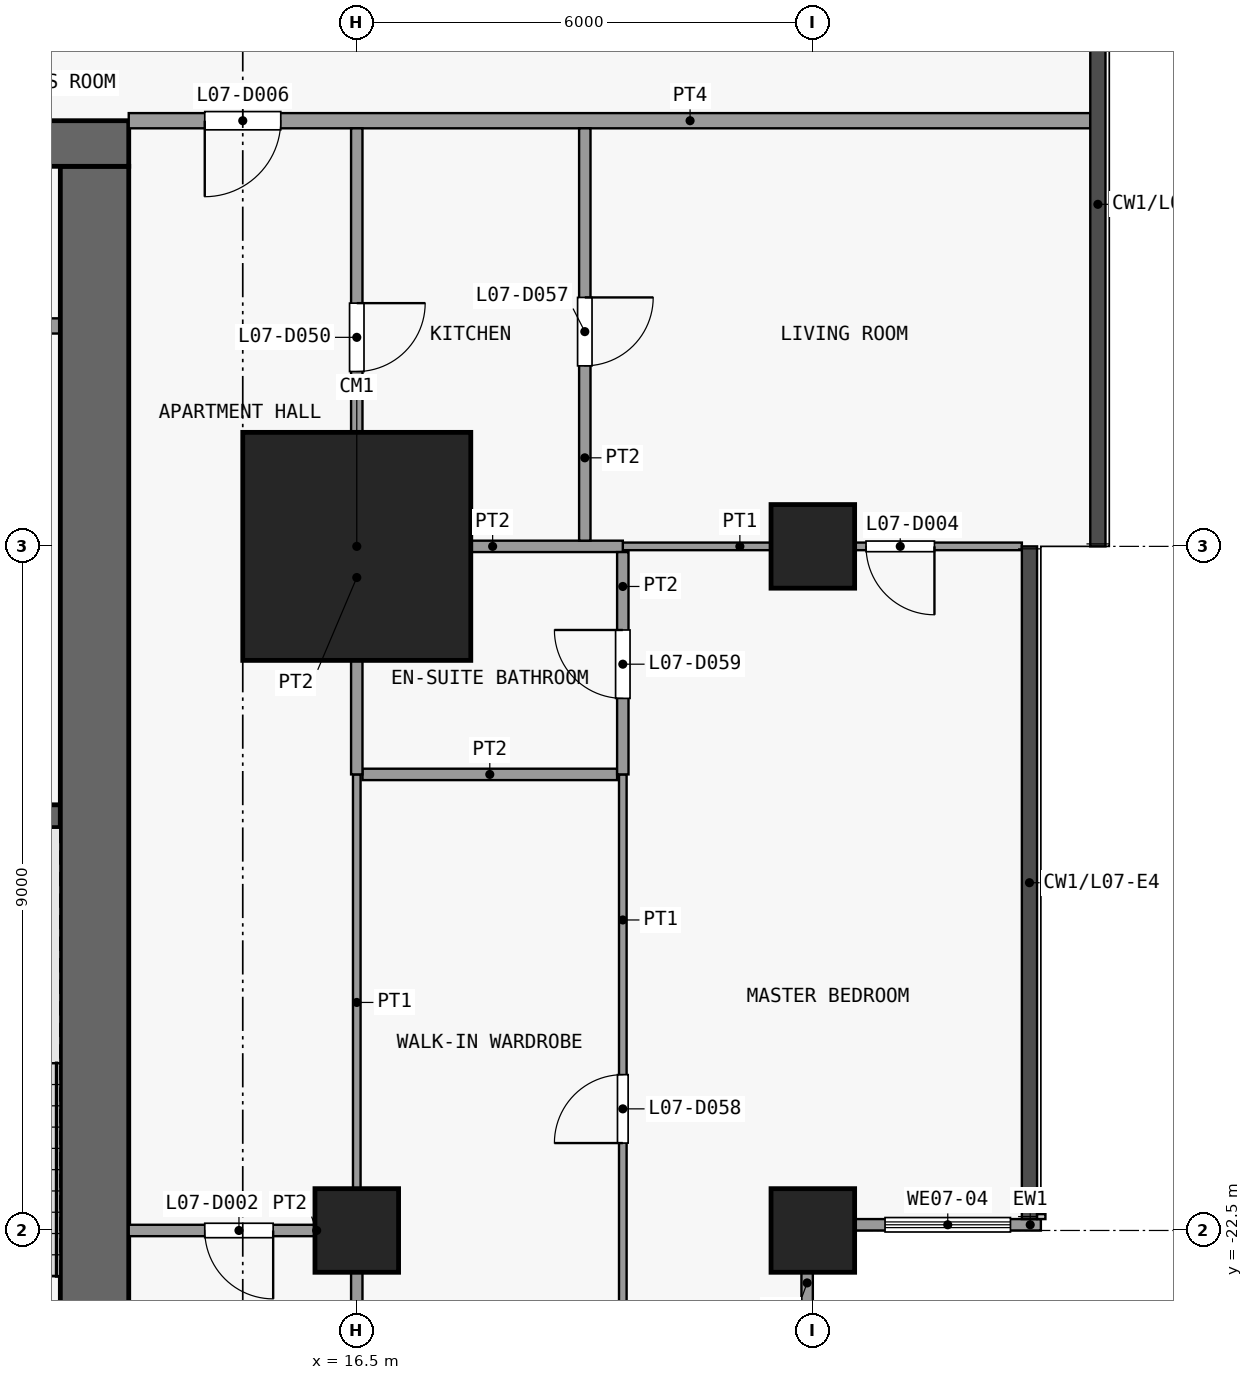
"""IFC4 building model, lengths in metres.
Left out: names, types, materials, properties, quantities, classifications, styles, units other than length and angle.
Written with IfcOpenShell. Run it as: python <this file> out.ifc"""

import sys

from ifc_helpers import new_model, si_unit, direction, frame, frame_2d, origin, origin_2d, place, context, subcontext, project, spatial, rectangle, extrude, element, fill, save


model = new_model("IFC4")
c1 = context("Model", 3, precision=1e-05, world=origin(), true_north=direction((0.0, 1.0)))
c2 = subcontext(c1, "Body", "Model", "MODEL_VIEW")
j1 = project(units=[si_unit("LENGTHUNIT", "METRE"), si_unit("PLANEANGLEUNIT", "RADIAN")], contexts=[c1])
p1 = place(None, origin())
s1 = spatial("IfcSite", under=j1, at=p1, CompositionType="ELEMENT")
p2 = place(p1, origin())
s2 = spatial("IfcBuilding", under=s1, at=p2, CompositionType="ELEMENT")
p3 = place(p2, frame((0.0, 0.0, 36.1)))
s3 = spatial("IfcBuildingStorey", under=s2, at=p3, CompositionType="ELEMENT", Elevation=36.1)
p4 = place(p3, frame((16.5, -22.5, 0.0), z_axis=(0.0, 0.0, 1.0), x_axis=(1.0, 0.0, 0.0)))
e1 = element("IfcColumn", 1, at=p4, inside=s3, PredefinedType="COLUMN", context=c2, shape_type="SweptSolid", body=[
    extrude(rectangle(XDim=1.1, YDim=1.1, at=origin_2d()), origin(), (0.0, 0.0, 1.0), 3.6),
])
p5 = place(p3, frame((16.5, -13.5, 0.0), z_axis=(0.0, 0.0, 1.0), x_axis=(1.0, 0.0, 0.0)))
e2 = element("IfcColumn", 2, at=p5, inside=s3, PredefinedType="COLUMN", context=c2, shape_type="SweptSolid", body=[
    extrude(rectangle(XDim=3.0, YDim=3.0, at=origin_2d()), origin(), (0.0, 0.0, 1.0), 3.6),
])
for number, where, z_axis, x_axis in (
    (3, (22.5, -22.5, 0.0), (0.0, 0.0, 1.0), (1.0, 0.0, 0.0)),
    (4, (22.5, -13.5, 0.0), (0.0, 0.0, 1.0), (1.0, 0.0, 0.0)),
):
    element("IfcColumn", number, at=place(p3, frame(where, z_axis=z_axis, x_axis=x_axis)), inside=s3, PredefinedType="COLUMN", context=c2, shape_type="SweptSolid", body=[
        extrude(rectangle(XDim=1.1, YDim=1.1, at=origin_2d()), origin(), (0.0, 0.0, 1.0), 3.6),
    ])
p6 = place(p3, frame((-13.5, -8.2, 0.0), z_axis=(0.0, 0.0, 1.0), x_axis=(1.0, 0.0, 0.0)))
e5 = element("IfcWall", 5, at=p6, inside=s3, PredefinedType="SHEAR", context=c2, shape_type="SweptSolid", body=[
    extrude(rectangle(XDim=27.0, YDim=0.6, at=frame_2d((13.5, 0.0))), origin(), (0.0, 0.0, 1.0), 3.3),
])
p7 = place(p6, frame((7.8, 0.0, 0.0)))
e6 = element("IfcOpeningElement", 6, at=p7, cuts=e5, PredefinedType="OPENING", context=c2, shape_type="SweptSolid", body=[
    extrude(rectangle(XDim=1.8, YDim=2.1, at=frame_2d((0.9, 1.05))), frame((0.0, 0.31, 0.0), z_axis=(0.0, -1.0, 0.0), x_axis=(1.0, 0.0, 0.0)), (0.0, 0.0, 1.0), 0.62),
])
p8 = place(p6, frame((17.4, 0.0, 0.0)))
e7 = element("IfcOpeningElement", 7, at=p8, cuts=e5, PredefinedType="OPENING", context=c2, shape_type="SweptSolid", body=[
    extrude(rectangle(XDim=1.8, YDim=2.1, at=frame_2d((0.9, 1.05))), frame((0.0, 0.31, 0.0), z_axis=(0.0, -1.0, 0.0), x_axis=(1.0, 0.0, 0.0)), (0.0, 0.0, 1.0), 0.62),
])
p9 = place(p6, frame((2.725, 0.0, 0.0)))
e8 = element("IfcOpeningElement", 8, at=p9, cuts=e5, PredefinedType="OPENING", context=c2, shape_type="SweptSolid", body=[
    extrude(rectangle(XDim=0.9, YDim=2.1, at=frame_2d((0.45, 1.05))), frame((0.0, 0.31, 0.0), z_axis=(0.0, -1.0, 0.0), x_axis=(1.0, 0.0, 0.0)), (0.0, 0.0, 1.0), 0.62),
])
p10 = place(p6, frame((23.375, 0.0, 0.0)))
e9 = element("IfcOpeningElement", 9, at=p10, cuts=e5, PredefinedType="OPENING", context=c2, shape_type="SweptSolid", body=[
    extrude(rectangle(XDim=0.9, YDim=2.1, at=frame_2d((0.45, 1.05))), frame((0.0, 0.31, 0.0), z_axis=(0.0, -1.0, 0.0), x_axis=(1.0, 0.0, 0.0)), (0.0, 0.0, 1.0), 0.62),
])
p11 = place(p3, frame((13.05, -24.6, 0.0), z_axis=(0.0, 0.0, 1.0), x_axis=(0.0, 1.0, 0.0)))
e10 = element("IfcWall", 10, at=p11, inside=s3, PredefinedType="SHEAR", context=c2, shape_type="SweptSolid", body=[
    extrude(rectangle(XDim=16.1, YDim=0.9, at=frame_2d((8.05, 0.0))), origin(), (0.0, 0.0, 1.0), 3.3),
])
p12 = place(p3, frame((9.5, -17.05, 0.0), z_axis=(0.0, 0.0, 1.0), x_axis=(1.0, 0.0, 0.0)))
e11 = element("IfcWall", 11, at=p12, inside=s3, PredefinedType="SHEAR", context=c2, shape_type="SweptSolid", body=[
    extrude(rectangle(XDim=3.1, YDim=0.3, at=frame_2d((1.55, 0.0))), origin(), (0.0, 0.0, 1.0), 3.3),
])
p13 = place(p3, frame((11.15, -10.6, 0.0), z_axis=(0.0, 0.0, 1.0), x_axis=(1.0, 0.0, 0.0)))
e12 = element("IfcWall", 12, at=p13, inside=s3, PredefinedType="PARTITIONING", context=c2, shape_type="SweptSolid", body=[
    extrude(rectangle(XDim=1.45, YDim=0.2, at=frame_2d((0.725, 0.0))), origin(), (0.0, 0.0, 1.0), 3.3),
])
p14 = place(p3, frame((22.425, -23.05, 0.0), z_axis=(0.0, 0.0, 1.0), x_axis=(0.0, -1.0, 0.0)))
e13 = element("IfcWall", 13, at=p14, inside=s3, PredefinedType="SOLIDWALL", context=c2, shape_type="SweptSolid", body=[
    extrude(rectangle(XDim=2.2, YDim=0.15, at=frame_2d((1.1, 0.0))), origin(), (0.0, 0.0, 1.0), 3.3),
])
p15 = place(p14, frame((0.4, 0.0, 0.9)))
e14 = element("IfcOpeningElement", 14, at=p15, cuts=e13, PredefinedType="OPENING", context=c2, shape_type="SweptSolid", body=[
    extrude(rectangle(XDim=1.4, YDim=2.4, at=frame_2d((0.7, 1.2))), frame((0.0, 0.085, 0.0), z_axis=(0.0, -1.0, 0.0), x_axis=(1.0, 0.0, 0.0)), (0.0, 0.0, 1.0), 0.17),
])
p16 = place(p3, frame((25.5, -22.425, 0.0), z_axis=(0.0, 0.0, 1.0), x_axis=(-1.0, 0.0, 0.0)))
e15 = element("IfcWall", 15, at=p16, inside=s3, PredefinedType="SOLIDWALL", context=c2, shape_type="SweptSolid", body=[
    extrude(rectangle(XDim=2.45, YDim=0.15, at=frame_2d((1.225, 0.0))), origin(), (0.0, 0.0, 1.0), 3.3),
])
p17 = place(p16, frame((0.4, 0.0, 0.9)))
e16 = element("IfcOpeningElement", 16, at=p17, cuts=e15, PredefinedType="OPENING", context=c2, shape_type="SweptSolid", body=[
    extrude(rectangle(XDim=1.65, YDim=2.4, at=frame_2d((0.825, 1.2))), frame((0.0, 0.085, 0.0), z_axis=(0.0, -1.0, 0.0), x_axis=(1.0, 0.0, 0.0)), (0.0, 0.0, 1.0), 0.17),
])
p18 = place(p3, frame((13.5, -22.5, 0.0), z_axis=(0.0, 0.0, 1.0), x_axis=(1.0, 0.0, 0.0)))
e17 = element("IfcWall", 17, at=p18, inside=s3, PredefinedType="PARTITIONING", context=c2, shape_type="SweptSolid", body=[
    extrude(rectangle(XDim=2.925, YDim=0.15, at=frame_2d((1.462, 0.0))), origin(), (0.0, 0.0, 1.0), 3.3),
])
p19 = place(p18, frame((1.0, 0.0, 0.0)))
e18 = element("IfcOpeningElement", 18, at=p19, cuts=e17, PredefinedType="OPENING", context=c2, shape_type="SweptSolid", body=[
    extrude(rectangle(XDim=0.9, YDim=2.1, at=frame_2d((0.45, 1.05))), frame((0.0, 0.085, 0.0), z_axis=(0.0, -1.0, 0.0), x_axis=(1.0, 0.0, 0.0)), (0.0, 0.0, 1.0), 0.17),
])
p20 = place(p3, frame((16.575, -16.5, 0.0), z_axis=(0.0, 0.0, 1.0), x_axis=(1.0, 0.0, 0.0)))
e19 = element("IfcWall", 19, at=p20, inside=s3, PredefinedType="PARTITIONING", context=c2, shape_type="SweptSolid", body=[
    extrude(rectangle(XDim=3.35, YDim=0.15, at=frame_2d((1.675, 0.0))), origin(), (0.0, 0.0, 1.0), 3.3),
])
p21 = place(p3, frame((20.0, -13.5, 0.0), z_axis=(0.0, 0.0, 1.0), x_axis=(1.0, 0.0, 0.0)))
e20 = element("IfcWall", 20, at=p21, inside=s3, PredefinedType="PARTITIONING", context=c2, shape_type="SweptSolid", body=[
    extrude(rectangle(XDim=5.25, YDim=0.1, at=frame_2d((2.625, 0.0))), origin(), (0.0, 0.0, 1.0), 3.3),
])
p22 = place(p21, frame((3.2, 0.0, 0.0)))
e21 = element("IfcOpeningElement", 21, at=p22, cuts=e20, PredefinedType="OPENING", context=c2, shape_type="SweptSolid", body=[
    extrude(rectangle(XDim=0.9, YDim=2.1, at=frame_2d((0.45, 1.05))), frame((0.0, 0.06, 0.0), z_axis=(0.0, -1.0, 0.0), x_axis=(1.0, 0.0, 0.0)), (0.0, 0.0, 1.0), 0.12),
])
p23 = place(p3, frame((16.575, -13.5, 0.0), z_axis=(0.0, 0.0, 1.0), x_axis=(1.0, 0.0, 0.0)))
e22 = element("IfcWall", 22, at=p23, inside=s3, PredefinedType="PARTITIONING", context=c2, shape_type="SweptSolid", body=[
    extrude(rectangle(XDim=3.425, YDim=0.15, at=frame_2d((1.712, 0.0))), origin(), (0.0, 0.0, 1.0), 3.3),
])
p24 = place(p3, frame((13.5, -7.9, 0.0), z_axis=(0.0, 0.0, 1.0), x_axis=(1.0, 0.0, 0.0)))
e23 = element("IfcWall", 23, at=p24, inside=s3, PredefinedType="PARTITIONING", context=c2, shape_type="SweptSolid", body=[
    extrude(rectangle(XDim=12.65, YDim=0.2, at=frame_2d((6.325, 0.0))), origin(), (0.0, 0.0, 1.0), 3.3),
])
p25 = place(p24, frame((1.0, 0.0, 0.0)))
e24 = element("IfcOpeningElement", 24, at=p25, cuts=e23, PredefinedType="OPENING", context=c2, shape_type="SweptSolid", body=[
    extrude(rectangle(XDim=1.0, YDim=2.1, at=frame_2d((0.5, 1.05))), frame((0.0, 0.11, 0.0), z_axis=(0.0, -1.0, 0.0), x_axis=(1.0, 0.0, 0.0)), (0.0, 0.0, 1.0), 0.22),
])
p26 = place(p3, frame((16.5, -22.5, 0.0), z_axis=(0.0, 0.0, 1.0), x_axis=(0.0, 1.0, 0.0)))
e25 = element("IfcWall", 25, at=p26, inside=s3, PredefinedType="PARTITIONING", context=c2, shape_type="SweptSolid", body=[
    extrude(rectangle(XDim=6.0, YDim=0.1, at=frame_2d((3.0, 0.0))), origin(), (0.0, 0.0, 1.0), 3.3),
])
p27 = place(p3, frame((16.5, -25.25, 0.0), z_axis=(0.0, 0.0, 1.0), x_axis=(0.0, 1.0, 0.0)))
e26 = element("IfcWall", 26, at=p27, inside=s3, PredefinedType="PARTITIONING", context=c2, shape_type="SweptSolid", body=[
    extrude(rectangle(XDim=2.75, YDim=0.15, at=frame_2d((1.375, 0.0))), origin(), (0.0, 0.0, 1.0), 3.3),
])
p28 = place(p3, frame((16.5, -16.5, 0.0), z_axis=(0.0, 0.0, 1.0), x_axis=(0.0, 1.0, 0.0)))
e27 = element("IfcWall", 27, at=p28, inside=s3, PredefinedType="PARTITIONING", context=c2, shape_type="SweptSolid", body=[
    extrude(rectangle(XDim=8.5, YDim=0.15, at=frame_2d((4.25, 0.0))), origin(), (0.0, 0.0, 1.0), 3.3),
])
p29 = place(p28, frame((5.3, 0.0, 0.0)))
e28 = element("IfcOpeningElement", 28, at=p29, cuts=e27, PredefinedType="OPENING", context=c2, shape_type="SweptSolid", body=[
    extrude(rectangle(XDim=0.9, YDim=2.1, at=frame_2d((0.45, 1.05))), frame((0.0, 0.085, 0.0), z_axis=(0.0, -1.0, 0.0), x_axis=(1.0, 0.0, 0.0)), (0.0, 0.0, 1.0), 0.17),
])
p30 = place(p3, frame((19.5, -13.425, 0.0), z_axis=(0.0, 0.0, 1.0), x_axis=(0.0, 1.0, 0.0)))
e29 = element("IfcWall", 29, at=p30, inside=s3, PredefinedType="PARTITIONING", context=c2, shape_type="SweptSolid", body=[
    extrude(rectangle(XDim=5.425, YDim=0.15, at=frame_2d((2.712, 0.0))), origin(), (0.0, 0.0, 1.0), 3.3),
])
p31 = place(p30, frame((2.3, 0.0, 0.0)))
e30 = element("IfcOpeningElement", 30, at=p31, cuts=e29, PredefinedType="OPENING", context=c2, shape_type="SweptSolid", body=[
    extrude(rectangle(XDim=0.9, YDim=2.1, at=frame_2d((0.45, 1.05))), frame((0.0, 0.085, 0.0), z_axis=(0.0, -1.0, 0.0), x_axis=(1.0, 0.0, 0.0)), (0.0, 0.0, 1.0), 0.17),
])
p32 = place(p3, frame((20.0, -25.25, 0.0), z_axis=(0.0, 0.0, 1.0), x_axis=(0.0, 1.0, 0.0)))
e31 = element("IfcWall", 31, at=p32, inside=s3, PredefinedType="PARTITIONING", context=c2, shape_type="SweptSolid", body=[
    extrude(rectangle(XDim=8.75, YDim=0.1, at=frame_2d((4.375, 0.0))), origin(), (0.0, 0.0, 1.0), 3.3),
])
p33 = place(p32, frame((3.9, 0.0, 0.0)))
e32 = element("IfcOpeningElement", 32, at=p33, cuts=e31, PredefinedType="OPENING", context=c2, shape_type="SweptSolid", body=[
    extrude(rectangle(XDim=0.9, YDim=2.1, at=frame_2d((0.45, 1.05))), frame((0.0, 0.06, 0.0), z_axis=(0.0, -1.0, 0.0), x_axis=(1.0, 0.0, 0.0)), (0.0, 0.0, 1.0), 0.12),
])
p34 = place(p3, frame((20.0, -16.5, 0.0), z_axis=(0.0, 0.0, 1.0), x_axis=(0.0, 1.0, 0.0)))
e33 = element("IfcWall", 33, at=p34, inside=s3, PredefinedType="PARTITIONING", context=c2, shape_type="SweptSolid", body=[
    extrude(rectangle(XDim=2.925, YDim=0.15, at=frame_2d((1.462, 0.0))), origin(), (0.0, 0.0, 1.0), 3.3),
])
p35 = place(p34, frame((1.0, 0.0, 0.0)))
e34 = element("IfcOpeningElement", 34, at=p35, cuts=e33, PredefinedType="OPENING", context=c2, shape_type="SweptSolid", body=[
    extrude(rectangle(XDim=0.9, YDim=2.1, at=frame_2d((0.45, 1.05))), frame((0.0, 0.085, 0.0), z_axis=(0.0, -1.0, 0.0), x_axis=(1.0, 0.0, 0.0)), (0.0, 0.0, 1.0), 0.17),
])
p36 = place(p17, origin())
e35 = element("IfcWindow", 35, at=p36, inside=s3, PartitioningType="SINGLE_PANEL", PredefinedType="WINDOW", context=c2, shape_type="SweptSolid", body=[
    extrude(rectangle(XDim=1.65, YDim=2.4, at=frame_2d((0.825, 1.2))), frame((0.0, 0.03, 0.0), z_axis=(0.0, -1.0, 0.0), x_axis=(1.0, 0.0, 0.0)), (0.0, 0.0, 1.0), 0.06),
])
fill(e16, e35)
p37 = place(p19, origin())
e36 = element("IfcDoor", 36, at=p37, inside=s3, OperationType="SINGLE_SWING_RIGHT", PredefinedType="DOOR", context=c2, shape_type="SweptSolid", body=[
    extrude(rectangle(XDim=0.9, YDim=2.1, at=frame_2d((0.45, 1.05))), frame((0.0, 0.025, 0.0), z_axis=(0.0, -1.0, 0.0), x_axis=(1.0, 0.0, 0.0)), (0.0, 0.0, 1.0), 0.05),
])
fill(e18, e36)
p38 = place(p22, origin())
e37 = element("IfcDoor", 37, at=p38, inside=s3, OperationType="SINGLE_SWING_RIGHT", PredefinedType="DOOR", context=c2, shape_type="SweptSolid", body=[
    extrude(rectangle(XDim=0.9, YDim=2.1, at=frame_2d((0.45, 1.05))), frame((0.0, 0.025, 0.0), z_axis=(0.0, -1.0, 0.0), x_axis=(1.0, 0.0, 0.0)), (0.0, 0.0, 1.0), 0.05),
])
fill(e21, e37)
p39 = place(p25, origin())
e38 = element("IfcDoor", 38, at=p39, inside=s3, OperationType="SINGLE_SWING_LEFT", PredefinedType="DOOR", context=c2, shape_type="SweptSolid", body=[
    extrude(rectangle(XDim=1.0, YDim=2.1, at=frame_2d((0.5, 1.05))), frame((0.0, 0.025, 0.0), z_axis=(0.0, -1.0, 0.0), x_axis=(1.0, 0.0, 0.0)), (0.0, 0.0, 1.0), 0.05),
])
fill(e24, e38)
p40 = place(p29, origin())
e39 = element("IfcDoor", 39, at=p40, inside=s3, OperationType="SINGLE_SWING_RIGHT", PredefinedType="DOOR", context=c2, shape_type="SweptSolid", body=[
    extrude(rectangle(XDim=0.9, YDim=2.1, at=frame_2d((0.45, 1.05))), frame((0.0, 0.025, 0.0), z_axis=(0.0, -1.0, 0.0), x_axis=(1.0, 0.0, 0.0)), (0.0, 0.0, 1.0), 0.05),
])
fill(e28, e39)
p41 = place(p31, origin())
e40 = element("IfcDoor", 40, at=p41, inside=s3, OperationType="SINGLE_SWING_RIGHT", PredefinedType="DOOR", context=c2, shape_type="SweptSolid", body=[
    extrude(rectangle(XDim=0.9, YDim=2.1, at=frame_2d((0.45, 1.05))), frame((0.0, 0.025, 0.0), z_axis=(0.0, -1.0, 0.0), x_axis=(1.0, 0.0, 0.0)), (0.0, 0.0, 1.0), 0.05),
])
fill(e30, e40)
p42 = place(p33, origin())
e41 = element("IfcDoor", 41, at=p42, inside=s3, OperationType="SINGLE_SWING_RIGHT", PredefinedType="DOOR", context=c2, shape_type="SweptSolid", body=[
    extrude(rectangle(XDim=0.9, YDim=2.1, at=frame_2d((0.45, 1.05))), frame((0.0, 0.025, 0.0), z_axis=(0.0, -1.0, 0.0), x_axis=(1.0, 0.0, 0.0)), (0.0, 0.0, 1.0), 0.05),
])
fill(e32, e41)
p43 = place(p35, origin())
e42 = element("IfcDoor", 42, at=p43, inside=s3, OperationType="SINGLE_SWING_LEFT", PredefinedType="DOOR", context=c2, shape_type="SweptSolid", body=[
    extrude(rectangle(XDim=0.9, YDim=2.1, at=frame_2d((0.45, 1.05))), frame((0.0, 0.025, 0.0), z_axis=(0.0, -1.0, 0.0), x_axis=(1.0, 0.0, 0.0)), (0.0, 0.0, 1.0), 0.05),
])
fill(e34, e42)
save(model, sys.argv[1])
